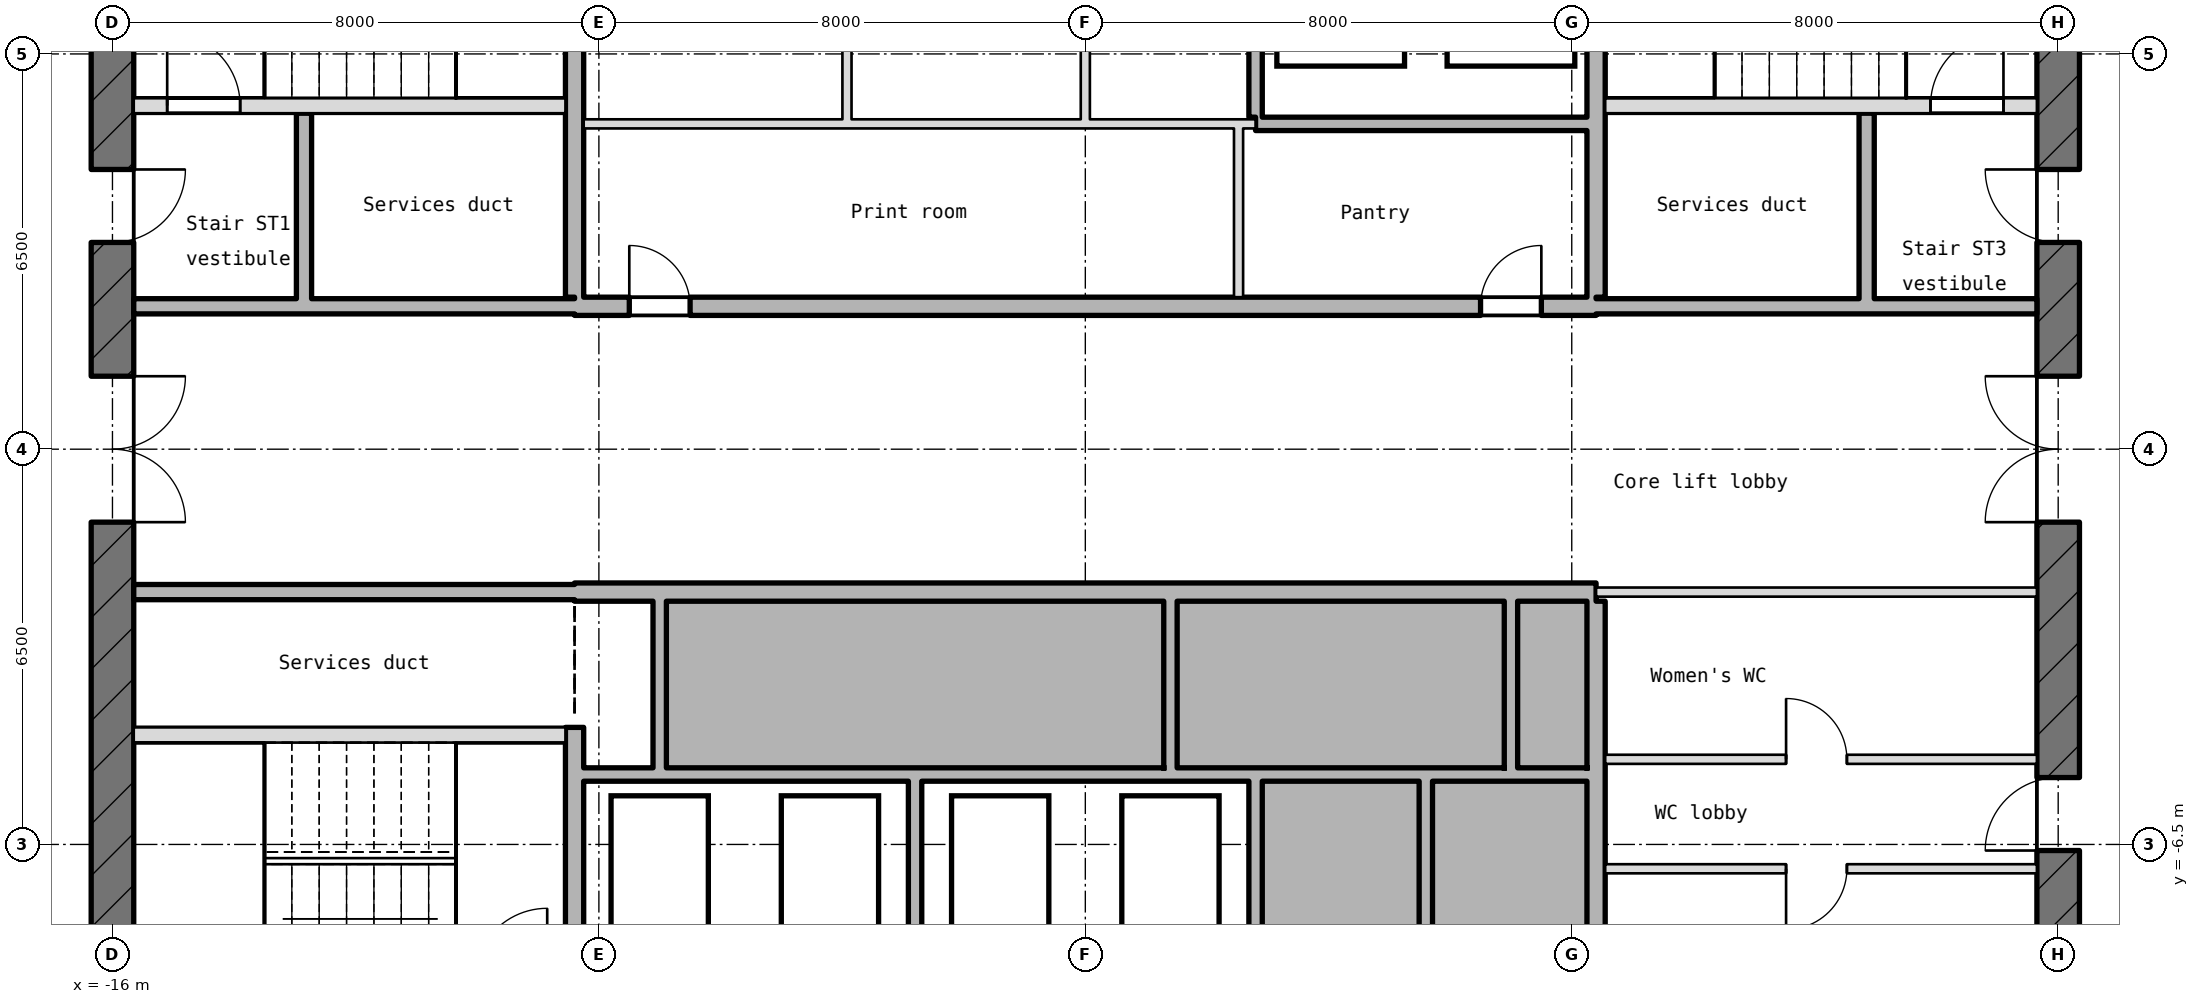
"""IFC4 building model, lengths in metres.
Left out: names, types, materials, properties, quantities, classifications, styles, units other than length and angle.
Written with IfcOpenShell. Run it as: python <this file> out.ifc"""

import sys

from ifc_helpers import new_model, si_unit, direction, frame, frame_2d, origin, place, context, subcontext, project, spatial, rectangle, extrude, element, fill, save


model = new_model("IFC4")
c1 = context("Model", 3, precision=1e-05, world=origin(), true_north=direction((0.0, 1.0)))
c2 = subcontext(c1, "Body", "Model", "MODEL_VIEW")
j1 = project(units=[si_unit("LENGTHUNIT", "METRE"), si_unit("PLANEANGLEUNIT", "RADIAN")], contexts=[c1])
p1 = place(None, origin())
s1 = spatial("IfcSite", under=j1, at=p1, CompositionType="ELEMENT")
p2 = place(p1, origin())
s2 = spatial("IfcBuilding", under=s1, at=p2, CompositionType="ELEMENT")
p3 = place(p2, frame((0.0, 0.0, 396.55)))
s3 = spatial("IfcBuildingStorey", under=s2, at=p3, CompositionType="ELEMENT", Elevation=396.55)
p4 = place(p3, frame((16.0, -10.145, -0.25), z_axis=(0.0, 0.0, 1.0), x_axis=(0.0, 1.0, 0.0)))
e1 = element("IfcWall", 1, at=p4, inside=s3, PredefinedType="SHEAR", context=c2, shape_type="SweptSolid", body=[
    extrude(rectangle(XDim=20.29, YDim=0.7, at=frame_2d((10.145, 0.0))), origin(), (0.0, 0.0, 1.0), 5.4),
])
p5 = place(p4, frame((8.945, 0.0, 0.25)))
e2 = element("IfcOpeningElement", 2, at=p5, cuts=e1, PredefinedType="OPENING", context=c2, shape_type="SweptSolid", body=[
    extrude(rectangle(XDim=2.4, YDim=2.1, at=frame_2d((1.2, 1.05))), frame((0.0, 0.36, 0.0), z_axis=(0.0, -1.0, 0.0), x_axis=(1.0, 0.0, 0.0)), (0.0, 0.0, 1.0), 0.72),
])
p6 = place(p4, frame((13.545, 0.0, 0.25)))
e3 = element("IfcOpeningElement", 3, at=p6, cuts=e1, PredefinedType="OPENING", context=c2, shape_type="SweptSolid", body=[
    extrude(rectangle(XDim=1.2, YDim=2.1, at=frame_2d((0.6, 1.05))), frame((0.0, 0.36, 0.0), z_axis=(0.0, -1.0, 0.0), x_axis=(1.0, 0.0, 0.0)), (0.0, 0.0, 1.0), 0.72),
])
p7 = place(p4, frame((3.545, 0.0, 0.25)))
e4 = element("IfcOpeningElement", 4, at=p7, cuts=e1, PredefinedType="OPENING", context=c2, shape_type="SweptSolid", body=[
    extrude(rectangle(XDim=1.2, YDim=2.1, at=frame_2d((0.6, 1.05))), frame((0.0, 0.36, 0.0), z_axis=(0.0, -1.0, 0.0), x_axis=(1.0, 0.0, 0.0)), (0.0, 0.0, 1.0), 0.72),
])
p8 = place(p3, frame((-16.0, 10.145, -0.25), z_axis=(0.0, 0.0, 1.0), x_axis=(0.0, -1.0, 0.0)))
e5 = element("IfcWall", 5, at=p8, inside=s3, PredefinedType="SHEAR", context=c2, shape_type="SweptSolid", body=[
    extrude(rectangle(XDim=20.29, YDim=0.7, at=frame_2d((10.145, 0.0))), origin(), (0.0, 0.0, 1.0), 5.4),
])
p9 = place(p8, frame((8.945, 0.0, 0.25)))
e6 = element("IfcOpeningElement", 6, at=p9, cuts=e5, PredefinedType="OPENING", context=c2, shape_type="SweptSolid", body=[
    extrude(rectangle(XDim=2.4, YDim=2.1, at=frame_2d((1.2, 1.05))), frame((0.0, 0.36, 0.0), z_axis=(0.0, -1.0, 0.0), x_axis=(1.0, 0.0, 0.0)), (0.0, 0.0, 1.0), 0.72),
])
p10 = place(p8, frame((5.545, 0.0, 0.25)))
e7 = element("IfcOpeningElement", 7, at=p10, cuts=e5, PredefinedType="OPENING", context=c2, shape_type="SweptSolid", body=[
    extrude(rectangle(XDim=1.2, YDim=2.1, at=frame_2d((0.6, 1.05))), frame((0.0, 0.36, 0.0), z_axis=(0.0, -1.0, 0.0), x_axis=(1.0, 0.0, 0.0)), (0.0, 0.0, 1.0), 0.72),
])
p11 = place(p3, frame((8.55, -6.9, 0.0), z_axis=(0.0, 0.0, 1.0), x_axis=(1.0, 0.0, 0.0)))
e8 = element("IfcWall", 8, at=p11, inside=s3, PredefinedType="PARTITIONING", context=c2, shape_type="SweptSolid", body=[
    extrude(rectangle(XDim=7.1, YDim=0.15, at=frame_2d((3.55, 0.0))), origin(), (0.0, 0.0, 1.0), 5.15),
])
p12 = place(p11, frame((2.975, 0.0, 0.0)))
e9 = element("IfcOpeningElement", 9, at=p12, cuts=e8, PredefinedType="OPENING", context=c2, shape_type="SweptSolid", body=[
    extrude(rectangle(XDim=1.0, YDim=2.1, at=frame_2d((0.5, 1.05))), frame((0.0, 0.085, 0.0), z_axis=(0.0, -1.0, 0.0), x_axis=(1.0, 0.0, 0.0)), (0.0, 0.0, 1.0), 0.17),
])
p13 = place(p3, frame((-8.25, -5.35, 0.0), z_axis=(0.0, 0.0, 1.0), x_axis=(1.0, 0.0, 0.0)))
e10 = element("IfcWall", 10, at=p13, inside=s3, PredefinedType="STANDARD", context=c2, shape_type="SweptSolid", body=[
    extrude(rectangle(XDim=16.5, YDim=0.22, at=frame_2d((8.25, 0.0))), origin(), (0.0, 0.0, 1.0), 5.15),
])
p14 = place(p3, frame((8.55, -5.1, 0.0), z_axis=(0.0, 0.0, 1.0), x_axis=(1.0, 0.0, 0.0)))
e11 = element("IfcWall", 11, at=p14, inside=s3, PredefinedType="PARTITIONING", context=c2, shape_type="SweptSolid", body=[
    extrude(rectangle(XDim=7.1, YDim=0.15, at=frame_2d((3.55, 0.0))), origin(), (0.0, 0.0, 1.0), 5.15),
])
p15 = place(p14, frame((2.975, 0.0, 0.0)))
e12 = element("IfcOpeningElement", 12, at=p15, cuts=e11, PredefinedType="OPENING", context=c2, shape_type="SweptSolid", body=[
    extrude(rectangle(XDim=1.0, YDim=2.1, at=frame_2d((0.5, 1.05))), frame((0.0, 0.085, 0.0), z_axis=(0.0, -1.0, 0.0), x_axis=(1.0, 0.0, 0.0)), (0.0, 0.0, 1.0), 0.17),
])
p16 = place(p3, frame((-15.65, -4.7, -0.25), z_axis=(0.0, 0.0, 1.0), x_axis=(1.0, 0.0, 0.0)))
e13 = element("IfcWall", 13, at=p16, inside=s3, PredefinedType="SHEAR", context=c2, shape_type="SweptSolid", body=[
    extrude(rectangle(XDim=7.1, YDim=0.25, at=frame_2d((3.55, 0.0))), origin(), (0.0, 0.0, 1.0), 5.4),
])
p17 = place(p3, frame((-15.65, -2.35, 0.0), z_axis=(0.0, 0.0, 1.0), x_axis=(1.0, 0.0, 0.0)))
e14 = element("IfcWall", 14, at=p17, inside=s3, PredefinedType="STANDARD", context=c2, shape_type="SweptSolid", body=[
    extrude(rectangle(XDim=7.25, YDim=0.25, at=frame_2d((3.625, 0.0))), origin(), (0.0, 0.0, 1.0), 5.15),
])
p18 = place(p3, frame((-8.4, -2.35, -0.25), z_axis=(0.0, 0.0, 1.0), x_axis=(1.0, 0.0, 0.0)))
e15 = element("IfcWall", 15, at=p18, inside=s3, PredefinedType="SHEAR", context=c2, shape_type="SweptSolid", body=[
    extrude(rectangle(XDim=16.8, YDim=0.3, at=frame_2d((8.4, 0.0))), origin(), (0.0, 0.0, 1.0), 5.4),
])
p19 = place(p3, frame((8.4, -2.35, 0.0), z_axis=(0.0, 0.0, 1.0), x_axis=(1.0, 0.0, 0.0)))
e16 = element("IfcWall", 16, at=p19, inside=s3, PredefinedType="PARTITIONING", context=c2, shape_type="SweptSolid", body=[
    extrude(rectangle(XDim=7.25, YDim=0.15, at=frame_2d((3.625, 0.0))), origin(), (0.0, 0.0, 1.0), 5.15),
])
p20 = place(p3, frame((-15.65, 2.35, 0.0), z_axis=(0.0, 0.0, 1.0), x_axis=(1.0, 0.0, 0.0)))
e17 = element("IfcWall", 17, at=p20, inside=s3, PredefinedType="STANDARD", context=c2, shape_type="SweptSolid", body=[
    extrude(rectangle(XDim=7.25, YDim=0.25, at=frame_2d((3.625, 0.0))), origin(), (0.0, 0.0, 1.0), 5.15),
])
p21 = place(p3, frame((-8.4, 2.35, -0.25), z_axis=(0.0, 0.0, 1.0), x_axis=(1.0, 0.0, 0.0)))
e18 = element("IfcWall", 18, at=p21, inside=s3, PredefinedType="SHEAR", context=c2, shape_type="SweptSolid", body=[
    extrude(rectangle(XDim=16.8, YDim=0.3, at=frame_2d((8.4, 0.0))), origin(), (0.0, 0.0, 1.0), 5.4),
])
p22 = place(p21, frame((0.9, 0.0, 0.25)))
e19 = element("IfcOpeningElement", 19, at=p22, cuts=e18, PredefinedType="OPENING", context=c2, shape_type="SweptSolid", body=[
    extrude(rectangle(XDim=1.0, YDim=2.1, at=frame_2d((0.5, 1.05))), frame((0.0, 0.16, 0.0), z_axis=(0.0, -1.0, 0.0), x_axis=(1.0, 0.0, 0.0)), (0.0, 0.0, 1.0), 0.32),
])
p23 = place(p21, frame((14.9, 0.0, 0.25)))
e20 = element("IfcOpeningElement", 20, at=p23, cuts=e18, PredefinedType="OPENING", context=c2, shape_type="SweptSolid", body=[
    extrude(rectangle(XDim=1.0, YDim=2.1, at=frame_2d((0.5, 1.05))), frame((0.0, 0.16, 0.0), z_axis=(0.0, -1.0, 0.0), x_axis=(1.0, 0.0, 0.0)), (0.0, 0.0, 1.0), 0.32),
])
p24 = place(p3, frame((8.4, 2.35, 0.0), z_axis=(0.0, 0.0, 1.0), x_axis=(1.0, 0.0, 0.0)))
e21 = element("IfcWall", 21, at=p24, inside=s3, PredefinedType="STANDARD", context=c2, shape_type="SweptSolid", body=[
    extrude(rectangle(XDim=7.25, YDim=0.25, at=frame_2d((3.625, 0.0))), origin(), (0.0, 0.0, 1.0), 5.15),
])
p25 = place(p3, frame((-8.25, 5.35, 0.0), z_axis=(0.0, 0.0, 1.0), x_axis=(1.0, 0.0, 0.0)))
e22 = element("IfcWall", 22, at=p25, inside=s3, PredefinedType="PARTITIONING", context=c2, shape_type="SweptSolid", body=[
    extrude(rectangle(XDim=11.05, YDim=0.15, at=frame_2d((5.525, 0.0))), origin(), (0.0, 0.0, 1.0), 5.15),
])
p26 = place(p3, frame((2.8, 5.35, 0.0), z_axis=(0.0, 0.0, 1.0), x_axis=(1.0, 0.0, 0.0)))
e23 = element("IfcWall", 23, at=p26, inside=s3, PredefinedType="STANDARD", context=c2, shape_type="SweptSolid", body=[
    extrude(rectangle(XDim=5.45, YDim=0.22, at=frame_2d((2.725, 0.0))), origin(), (0.0, 0.0, 1.0), 5.15),
])
p27 = place(p3, frame((-15.65, 5.65, -0.25), z_axis=(0.0, 0.0, 1.0), x_axis=(1.0, 0.0, 0.0)))
e24 = element("IfcWall", 24, at=p27, inside=s3, PredefinedType="SHEAR", context=c2, shape_type="SweptSolid", body=[
    extrude(rectangle(XDim=7.1, YDim=0.25, at=frame_2d((3.55, 0.0))), origin(), (0.0, 0.0, 1.0), 5.4),
])
p28 = place(p27, frame((0.55, 0.0, 0.25)))
e25 = element("IfcOpeningElement", 25, at=p28, cuts=e24, PredefinedType="OPENING", context=c2, shape_type="SweptSolid", body=[
    extrude(rectangle(XDim=1.2, YDim=2.1, at=frame_2d((0.6, 1.05))), frame((0.0, 0.135, 0.0), z_axis=(0.0, -1.0, 0.0), x_axis=(1.0, 0.0, 0.0)), (0.0, 0.0, 1.0), 0.27),
])
p29 = place(p3, frame((8.55, 5.65, -0.25), z_axis=(0.0, 0.0, 1.0), x_axis=(1.0, 0.0, 0.0)))
e26 = element("IfcWall", 26, at=p29, inside=s3, PredefinedType="SHEAR", context=c2, shape_type="SweptSolid", body=[
    extrude(rectangle(XDim=7.1, YDim=0.25, at=frame_2d((3.55, 0.0))), origin(), (0.0, 0.0, 1.0), 5.4),
])
p30 = place(p29, frame((5.35, 0.0, 0.25)))
e27 = element("IfcOpeningElement", 27, at=p30, cuts=e26, PredefinedType="OPENING", context=c2, shape_type="SweptSolid", body=[
    extrude(rectangle(XDim=1.2, YDim=2.1, at=frame_2d((0.6, 1.05))), frame((0.0, 0.135, 0.0), z_axis=(0.0, -1.0, 0.0), x_axis=(1.0, 0.0, 0.0)), (0.0, 0.0, 1.0), 0.27),
])
p31 = place(p3, frame((-12.85, 2.475, 0.0), z_axis=(0.0, 0.0, 1.0), x_axis=(0.0, 1.0, 0.0)))
e28 = element("IfcWall", 28, at=p31, inside=s3, PredefinedType="STANDARD", context=c2, shape_type="SweptSolid", body=[
    extrude(rectangle(XDim=3.05, YDim=0.25, at=frame_2d((1.525, 0.0))), origin(), (0.0, 0.0, 1.0), 5.15),
])
p32 = place(p3, frame((-8.4, -8.75, -0.25), z_axis=(0.0, 0.0, 1.0), x_axis=(0.0, 1.0, 0.0)))
e29 = element("IfcWall", 29, at=p32, inside=s3, PredefinedType="SHEAR", context=c2, shape_type="SweptSolid", body=[
    extrude(rectangle(XDim=4.175, YDim=0.3, at=frame_2d((2.087, 0.0))), origin(), (0.0, 0.0, 1.0), 5.4),
])
p33 = place(p3, frame((-8.4, 2.5, -0.25), z_axis=(0.0, 0.0, 1.0), x_axis=(0.0, 1.0, 0.0)))
e30 = element("IfcWall", 30, at=p33, inside=s3, PredefinedType="SHEAR", context=c2, shape_type="SweptSolid", body=[
    extrude(rectangle(XDim=5.85, YDim=0.3, at=frame_2d((2.925, 0.0))), origin(), (0.0, 0.0, 1.0), 5.4),
])
p34 = place(p3, frame((-7.0, -5.24, 0.0), z_axis=(0.0, 0.0, 1.0), x_axis=(0.0, 1.0, 0.0)))
e31 = element("IfcWall", 31, at=p34, inside=s3, PredefinedType="STANDARD", context=c2, shape_type="SweptSolid", body=[
    extrude(rectangle(XDim=2.74, YDim=0.22, at=frame_2d((1.37, 0.0))), origin(), (0.0, 0.0, 1.0), 5.15),
])
p35 = place(p3, frame((-3.92, 5.425, 0.0), z_axis=(0.0, 0.0, 1.0), x_axis=(0.0, 1.0, 0.0)))
e32 = element("IfcWall", 32, at=p35, inside=s3, PredefinedType="PARTITIONING", context=c2, shape_type="SweptSolid", body=[
    extrude(rectangle(XDim=2.85, YDim=0.15, at=frame_2d((1.425, 0.0))), origin(), (0.0, 0.0, 1.0), 5.15),
])
p36 = place(p3, frame((-2.8, -8.35, 0.0), z_axis=(0.0, 0.0, 1.0), x_axis=(0.0, 1.0, 0.0)))
e33 = element("IfcWall", 33, at=p36, inside=s3, PredefinedType="STANDARD", context=c2, shape_type="SweptSolid", body=[
    extrude(rectangle(XDim=2.89, YDim=0.22, at=frame_2d((1.445, 0.0))), origin(), (0.0, 0.0, 1.0), 5.15),
])
p37 = place(p3, frame((0.0, 5.425, 0.0), z_axis=(0.0, 0.0, 1.0), x_axis=(0.0, 1.0, 0.0)))
e34 = element("IfcWall", 34, at=p37, inside=s3, PredefinedType="PARTITIONING", context=c2, shape_type="SweptSolid", body=[
    extrude(rectangle(XDim=2.85, YDim=0.15, at=frame_2d((1.425, 0.0))), origin(), (0.0, 0.0, 1.0), 5.15),
])
p38 = place(p3, frame((1.4, -5.24, 0.0), z_axis=(0.0, 0.0, 1.0), x_axis=(0.0, 1.0, 0.0)))
e35 = element("IfcWall", 35, at=p38, inside=s3, PredefinedType="STANDARD", context=c2, shape_type="SweptSolid", body=[
    extrude(rectangle(XDim=2.74, YDim=0.22, at=frame_2d((1.37, 0.0))), origin(), (0.0, 0.0, 1.0), 5.15),
])
p39 = place(p3, frame((2.52, 2.5, 0.0), z_axis=(0.0, 0.0, 1.0), x_axis=(0.0, 1.0, 0.0)))
e36 = element("IfcWall", 36, at=p39, inside=s3, PredefinedType="PARTITIONING", context=c2, shape_type="SweptSolid", body=[
    extrude(rectangle(XDim=2.775, YDim=0.15, at=frame_2d((1.387, 0.0))), origin(), (0.0, 0.0, 1.0), 5.15),
])
for number, where, z_axis, x_axis in (
    (37, (2.8, -8.24, 0.0), (0.0, 0.0, 1.0), (0.0, 1.0, 0.0)),
    (38, (2.8, 5.46, 0.0), (0.0, 0.0, 1.0), (0.0, 1.0, 0.0)),
    (39, (5.6, -8.24, 0.0), (0.0, 0.0, 1.0), (0.0, 1.0, 0.0)),
):
    element("IfcWall", number, at=place(p3, frame(where, z_axis=z_axis, x_axis=x_axis)), inside=s3, PredefinedType="STANDARD", context=c2, shape_type="SweptSolid", body=[
        extrude(rectangle(XDim=2.78, YDim=0.22, at=frame_2d((1.39, 0.0))), origin(), (0.0, 0.0, 1.0), 5.15),
    ])
p40 = place(p3, frame((7.0, -5.24, 0.0), z_axis=(0.0, 0.0, 1.0), x_axis=(0.0, 1.0, 0.0)))
e40 = element("IfcWall", 40, at=p40, inside=s3, PredefinedType="STANDARD", context=c2, shape_type="SweptSolid", body=[
    extrude(rectangle(XDim=2.74, YDim=0.22, at=frame_2d((1.37, 0.0))), origin(), (0.0, 0.0, 1.0), 5.15),
])
for number, where, z_axis, x_axis in (
    (41, (8.4, -8.35, -0.25), (0.0, 0.0, 1.0), (0.0, 1.0, 0.0)),
    (42, (8.4, 2.5, -0.25), (0.0, 0.0, 1.0), (0.0, 1.0, 0.0)),
):
    element("IfcWall", number, at=place(p3, frame(where, z_axis=z_axis, x_axis=x_axis)), inside=s3, PredefinedType="SHEAR", context=c2, shape_type="SweptSolid", body=[
        extrude(rectangle(XDim=5.85, YDim=0.3, at=frame_2d((2.925, 0.0))), origin(), (0.0, 0.0, 1.0), 5.4),
    ])
p41 = place(p3, frame((12.85, 2.475, 0.0), z_axis=(0.0, 0.0, 1.0), x_axis=(0.0, 1.0, 0.0)))
e43 = element("IfcWall", 43, at=p41, inside=s3, PredefinedType="STANDARD", context=c2, shape_type="SweptSolid", body=[
    extrude(rectangle(XDim=3.05, YDim=0.25, at=frame_2d((1.525, 0.0))), origin(), (0.0, 0.0, 1.0), 5.15),
])
p42 = place(p28, origin())
e44 = element("IfcDoor", 44, at=p42, inside=s3, OperationType="SINGLE_SWING_RIGHT", PredefinedType="DOOR", context=c2, shape_type="SweptSolid", body=[
    extrude(rectangle(XDim=1.2, YDim=2.1, at=frame_2d((0.6, 1.05))), frame((0.0, 0.025, 0.0), z_axis=(0.0, -1.0, 0.0), x_axis=(1.0, 0.0, 0.0)), (0.0, 0.0, 1.0), 0.05),
])
fill(e25, e44)
p43 = place(p30, origin())
e45 = element("IfcDoor", 45, at=p43, inside=s3, OperationType="SINGLE_SWING_RIGHT", PredefinedType="DOOR", context=c2, shape_type="SweptSolid", body=[
    extrude(rectangle(XDim=1.2, YDim=2.1, at=frame_2d((0.6, 1.05))), frame((0.0, 0.025, 0.0), z_axis=(0.0, -1.0, 0.0), x_axis=(1.0, 0.0, 0.0)), (0.0, 0.0, 1.0), 0.05),
])
fill(e27, e45)
p44 = place(p9, origin())
e46 = element("IfcDoor", 46, at=p44, inside=s3, OperationType="DOUBLE_DOOR_SINGLE_SWING", PredefinedType="DOOR", context=c2, shape_type="SweptSolid", body=[
    extrude(rectangle(XDim=2.4, YDim=2.1, at=frame_2d((1.2, 1.05))), frame((0.0, 0.025, 0.0), z_axis=(0.0, -1.0, 0.0), x_axis=(1.0, 0.0, 0.0)), (0.0, 0.0, 1.0), 0.05),
])
fill(e6, e46)
p45 = place(p5, origin())
e47 = element("IfcDoor", 47, at=p45, inside=s3, OperationType="DOUBLE_DOOR_SINGLE_SWING", PredefinedType="DOOR", context=c2, shape_type="SweptSolid", body=[
    extrude(rectangle(XDim=2.4, YDim=2.1, at=frame_2d((1.2, 1.05))), frame((0.0, 0.025, 0.0), z_axis=(0.0, -1.0, 0.0), x_axis=(1.0, 0.0, 0.0)), (0.0, 0.0, 1.0), 0.05),
])
fill(e2, e47)
p46 = place(p10, origin())
e48 = element("IfcDoor", 48, at=p46, inside=s3, OperationType="SINGLE_SWING_RIGHT", PredefinedType="DOOR", context=c2, shape_type="SweptSolid", body=[
    extrude(rectangle(XDim=1.2, YDim=2.1, at=frame_2d((0.6, 1.05))), frame((0.0, 0.025, 0.0), z_axis=(0.0, -1.0, 0.0), x_axis=(1.0, 0.0, 0.0)), (0.0, 0.0, 1.0), 0.05),
])
fill(e7, e48)
p47 = place(p6, origin())
e49 = element("IfcDoor", 49, at=p47, inside=s3, OperationType="SINGLE_SWING_RIGHT", PredefinedType="DOOR", context=c2, shape_type="SweptSolid", body=[
    extrude(rectangle(XDim=1.2, YDim=2.1, at=frame_2d((0.6, 1.05))), frame((0.0, 0.025, 0.0), z_axis=(0.0, -1.0, 0.0), x_axis=(1.0, 0.0, 0.0)), (0.0, 0.0, 1.0), 0.05),
])
fill(e3, e49)
p48 = place(p22, origin())
e50 = element("IfcDoor", 50, at=p48, inside=s3, OperationType="SINGLE_SWING_RIGHT", PredefinedType="DOOR", context=c2, shape_type="SweptSolid", body=[
    extrude(rectangle(XDim=1.0, YDim=2.1, at=frame_2d((0.5, 1.05))), frame((0.0, 0.025, 0.0), z_axis=(0.0, -1.0, 0.0), x_axis=(1.0, 0.0, 0.0)), (0.0, 0.0, 1.0), 0.05),
])
fill(e19, e50)
p49 = place(p23, origin())
e51 = element("IfcDoor", 51, at=p49, inside=s3, OperationType="SINGLE_SWING_RIGHT", PredefinedType="DOOR", context=c2, shape_type="SweptSolid", body=[
    extrude(rectangle(XDim=1.0, YDim=2.1, at=frame_2d((0.5, 1.05))), frame((0.0, 0.025, 0.0), z_axis=(0.0, -1.0, 0.0), x_axis=(1.0, 0.0, 0.0)), (0.0, 0.0, 1.0), 0.05),
])
fill(e20, e51)
p50 = place(p15, origin())
e52 = element("IfcDoor", 52, at=p50, inside=s3, OperationType="SINGLE_SWING_RIGHT", PredefinedType="DOOR", context=c2, shape_type="SweptSolid", body=[
    extrude(rectangle(XDim=1.0, YDim=2.1, at=frame_2d((0.5, 1.05))), frame((0.0, 0.025, 0.0), z_axis=(0.0, -1.0, 0.0), x_axis=(1.0, 0.0, 0.0)), (0.0, 0.0, 1.0), 0.05),
])
fill(e12, e52)
p51 = place(p7, origin())
e53 = element("IfcDoor", 53, at=p51, inside=s3, OperationType="SINGLE_SWING_RIGHT", PredefinedType="DOOR", context=c2, shape_type="SweptSolid", body=[
    extrude(rectangle(XDim=1.2, YDim=2.1, at=frame_2d((0.6, 1.05))), frame((0.0, 0.025, 0.0), z_axis=(0.0, -1.0, 0.0), x_axis=(1.0, 0.0, 0.0)), (0.0, 0.0, 1.0), 0.05),
])
fill(e4, e53)
p52 = place(p12, frame((1.0, 0.0, 0.0), z_axis=(0.0, 0.0, 1.0), x_axis=(-1.0, 0.0, 0.0)))
e54 = element("IfcDoor", 54, at=p52, inside=s3, OperationType="SINGLE_SWING_LEFT", PredefinedType="DOOR", context=c2, shape_type="SweptSolid", body=[
    extrude(rectangle(XDim=1.0, YDim=2.1, at=frame_2d((0.5, 1.05))), frame((0.0, 0.025, 0.0), z_axis=(0.0, -1.0, 0.0), x_axis=(1.0, 0.0, 0.0)), (0.0, 0.0, 1.0), 0.05),
])
fill(e9, e54)
save(model, sys.argv[1])
